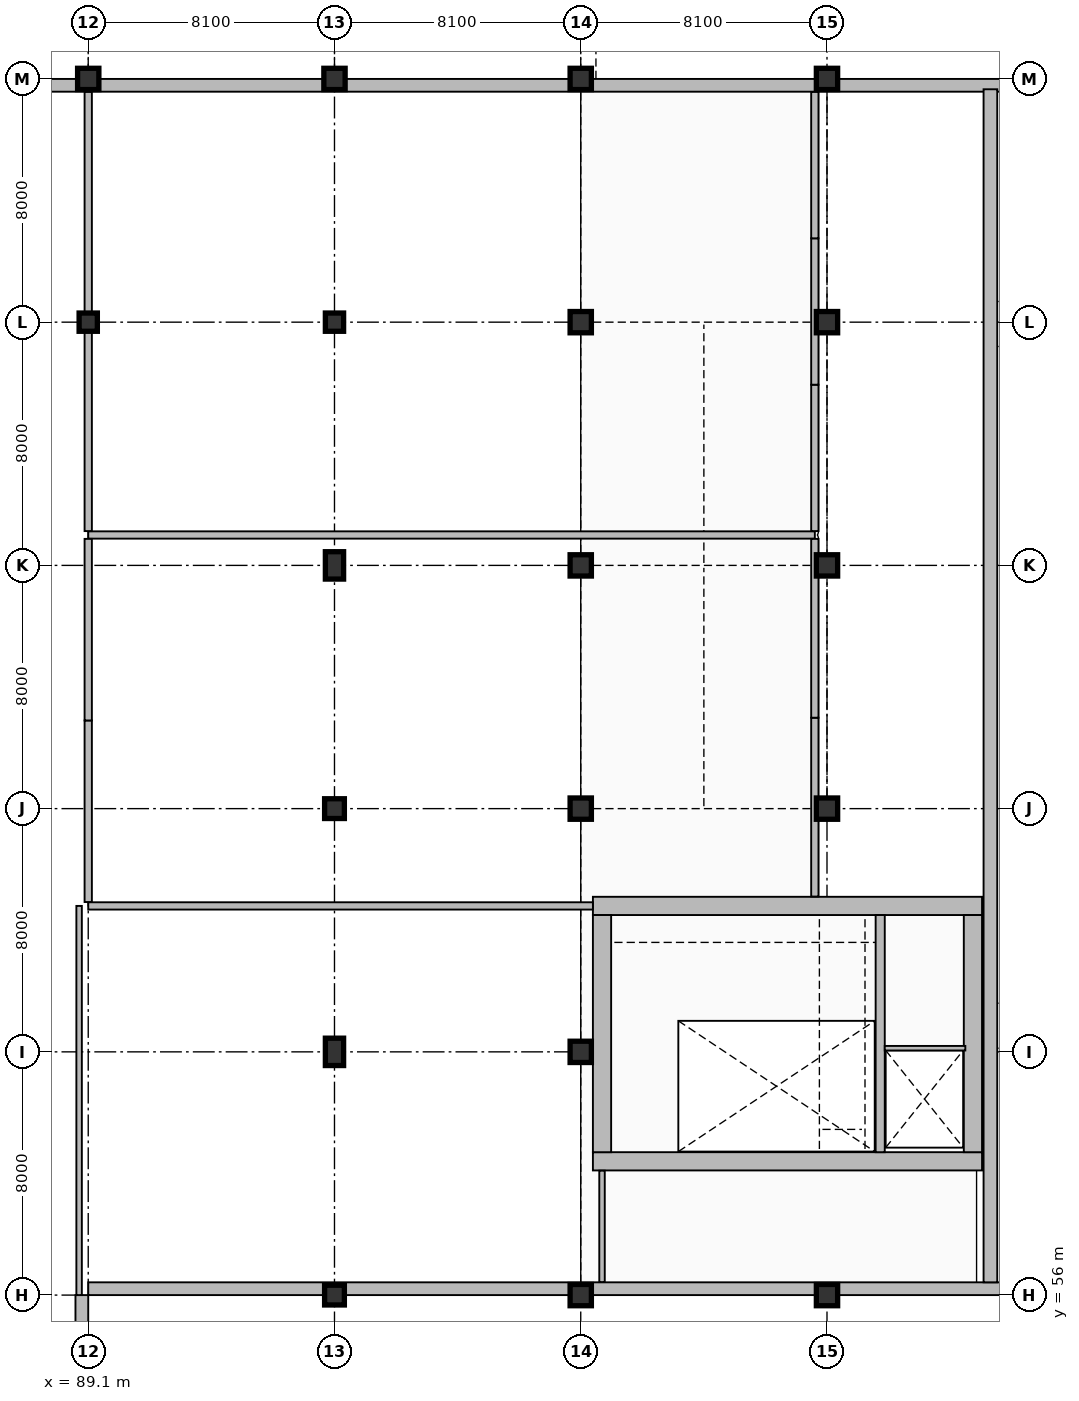
"""IFC4 building model, lengths in metres.
Left out: names, types, materials, properties, quantities, classifications, styles, units other than length and angle.
Written with IfcOpenShell. Run it as: python <this file> out.ifc"""

import sys

from ifc_helpers import new_model, si_unit, direction, frame, frame_2d, origin, origin_2d, place, context, subcontext, project, spatial, rectangle, extrude, element, fill, save


model = new_model("IFC4")
c1 = context("Model", 3, precision=1e-05, world=origin(), true_north=direction((0.0, 1.0)))
c2 = subcontext(c1, "Body", "Model", "MODEL_VIEW")
j1 = project(units=[si_unit("LENGTHUNIT", "METRE"), si_unit("PLANEANGLEUNIT", "RADIAN")], contexts=[c1])
p1 = place(None, origin())
s1 = spatial("IfcSite", under=j1, at=p1, CompositionType="ELEMENT")
p2 = place(p1, origin())
s2 = spatial("IfcBuilding", under=s1, at=p2, CompositionType="ELEMENT")
p3 = place(p2, frame((0.0, 0.0, -4.8)))
s3 = spatial("IfcBuildingStorey", under=s2, at=p3, CompositionType="ELEMENT", Elevation=-4.8)
p4 = place(p3, frame((64.8, 95.79, 0.0), z_axis=(0.0, 0.0, 1.0), x_axis=(1.0, 0.0, 0.0)))
e1 = element("IfcWall", 1, at=p4, inside=s3, PredefinedType="USERDEFINED", context=c2, shape_type="SweptSolid", body=[
    extrude(rectangle(XDim=61.99, YDim=0.42, at=frame_2d((30.995, 0.0))), origin(), (0.0, 0.0, 1.0), 4.45),
])
p5 = place(p3, frame((126.79, 56.21, 0.0), z_axis=(0.0, 0.0, 1.0), x_axis=(-1.0, 0.0, 0.0)))
e2 = element("IfcWall", 2, at=p5, inside=s3, PredefinedType="USERDEFINED", context=c2, shape_type="SweptSolid", body=[
    extrude(rectangle(XDim=37.69, YDim=0.42, at=frame_2d((18.845, 0.0))), origin(), (0.0, 0.0, 1.0), 4.45),
])
p6 = place(p3, frame((88.89, 56.0, 0.0), z_axis=(0.0, 0.0, 1.0), x_axis=(0.0, -1.0, 0.0)))
e3 = element("IfcWall", 3, at=p6, inside=s3, PredefinedType="USERDEFINED", context=c2, shape_type="SweptSolid", body=[
    extrude(rectangle(XDim=31.79, YDim=0.42, at=frame_2d((15.895, 0.0))), origin(), (0.0, 0.0, 1.0), 4.45),
])
p7 = place(p3, frame((118.775, 56.42, 0.0), z_axis=(0.0, 0.0, 1.0), x_axis=(0.0, 1.0, 0.0)))
e4 = element("IfcWall", 4, at=p7, inside=s3, PredefinedType="SHEAR", context=c2, shape_type="SweptSolid", body=[
    extrude(rectangle(XDim=39.24, YDim=0.45, at=frame_2d((19.62, 0.0))), origin(), (0.0, 0.0, 1.0), 4.45),
])
p8 = place(p3, frame((105.7, 60.4, 0.0), z_axis=(0.0, 0.0, 1.0), x_axis=(1.0, 0.0, 0.0)))
e5 = element("IfcWall", 5, at=p8, inside=s3, PredefinedType="SHEAR", context=c2, shape_type="SweptSolid", body=[
    extrude(rectangle(XDim=12.8, YDim=0.6, at=frame_2d((6.4, 0.0))), origin(), (0.0, 0.0, 1.0), 4.8),
])
p9 = place(p8, frame((1.05, 0.0, 0.0)))
e6 = element("IfcOpeningElement", 6, at=p9, cuts=e5, PredefinedType="OPENING", context=c2, shape_type="SweptSolid", body=[
    extrude(rectangle(XDim=1.15, YDim=2.25, at=frame_2d((0.575, 1.125))), frame((0.0, 0.31, 0.0), z_axis=(0.0, -1.0, 0.0), x_axis=(1.0, 0.0, 0.0)), (0.0, 0.0, 1.0), 0.62),
])
p10 = place(p8, frame((10.255, 0.0, 0.0)))
e7 = element("IfcOpeningElement", 7, at=p10, cuts=e5, PredefinedType="OPENING", context=c2, shape_type="SweptSolid", body=[
    extrude(rectangle(XDim=1.3, YDim=2.3, at=frame_2d((0.65, 1.15))), frame((0.0, 0.31, 0.0), z_axis=(0.0, -1.0, 0.0), x_axis=(1.0, 0.0, 0.0)), (0.0, 0.0, 1.0), 0.62),
])
p11 = place(p3, frame((105.7, 68.8, 0.0), z_axis=(0.0, 0.0, 1.0), x_axis=(1.0, 0.0, 0.0)))
e8 = element("IfcWall", 8, at=p11, inside=s3, PredefinedType="SHEAR", context=c2, shape_type="SweptSolid", body=[
    extrude(rectangle(XDim=12.8, YDim=0.6, at=frame_2d((6.4, 0.0))), origin(), (0.0, 0.0, 1.0), 4.8),
])
for number, where, z_axis, x_axis in (
    (9, (106.0, 60.7, 0.0), (0.0, 0.0, 1.0), (0.0, 1.0, 0.0)),
    (10, (118.2, 60.7, 0.0), (0.0, 0.0, 1.0), (0.0, 1.0, 0.0)),
):
    element("IfcWall", number, at=place(p3, frame(where, z_axis=z_axis, x_axis=x_axis)), inside=s3, PredefinedType="SHEAR", context=c2, shape_type="SweptSolid", body=[
        extrude(rectangle(XDim=7.8, YDim=0.6, at=frame_2d((3.9, 0.0))), origin(), (0.0, 0.0, 1.0), 4.8),
    ])
p12 = place(p3, frame((115.15, 60.7, 0.0), z_axis=(0.0, 0.0, 1.0), x_axis=(0.0, 1.0, 0.0)))
e11 = element("IfcWall", 11, at=p12, inside=s3, PredefinedType="SHEAR", context=c2, shape_type="SweptSolid", body=[
    extrude(rectangle(XDim=7.8, YDim=0.3, at=frame_2d((3.9, 0.0))), origin(), (0.0, 0.0, 1.0), 4.8),
])
p13 = place(p3, frame((89.1, 88.0, 0.0), z_axis=(0.0, 0.0, 1.0), x_axis=(1.0, 0.0, 0.0)))
e12 = element("IfcColumn", 12, at=p13, inside=s3, PredefinedType="COLUMN", context=c2, shape_type="SweptSolid", body=[
    extrude(rectangle(XDim=0.6, YDim=0.6, at=origin_2d()), origin(), (0.0, 0.0, 1.0), 4.45),
])
p14 = place(p3, frame((89.1, 96.0, 0.0), z_axis=(0.0, 0.0, 1.0), x_axis=(1.0, 0.0, 0.0)))
e13 = element("IfcColumn", 13, at=p14, inside=s3, PredefinedType="COLUMN", context=c2, shape_type="SweptSolid", body=[
    extrude(rectangle(XDim=0.7, YDim=0.7, at=origin_2d()), origin(), (0.0, 0.0, 1.0), 4.8),
])
p15 = place(p3, frame((97.2, 56.0, 0.0), z_axis=(0.0, 0.0, 1.0), x_axis=(1.0, 0.0, 0.0)))
e14 = element("IfcColumn", 14, at=p15, inside=s3, PredefinedType="COLUMN", context=c2, shape_type="SweptSolid", body=[
    extrude(rectangle(XDim=0.65, YDim=0.65, at=origin_2d()), origin(), (0.0, 0.0, 1.0), 4.8),
])
p16 = place(p3, frame((97.2, 64.0, 0.0), z_axis=(0.0, 0.0, 1.0), x_axis=(1.0, 0.0, 0.0)))
e15 = element("IfcColumn", 15, at=p16, inside=s3, PredefinedType="COLUMN", context=c2, shape_type="SweptSolid", body=[
    extrude(rectangle(XDim=0.6, YDim=0.9, at=origin_2d()), origin(), (0.0, 0.0, 1.0), 4.8),
])
p17 = place(p3, frame((97.2, 72.0, 0.0), z_axis=(0.0, 0.0, 1.0), x_axis=(1.0, 0.0, 0.0)))
e16 = element("IfcColumn", 16, at=p17, inside=s3, PredefinedType="COLUMN", context=c2, shape_type="SweptSolid", body=[
    extrude(rectangle(XDim=0.65, YDim=0.65, at=origin_2d()), origin(), (0.0, 0.0, 1.0), 4.8),
])
p18 = place(p3, frame((97.2, 80.0, 0.0), z_axis=(0.0, 0.0, 1.0), x_axis=(1.0, 0.0, 0.0)))
e17 = element("IfcColumn", 17, at=p18, inside=s3, PredefinedType="COLUMN", context=c2, shape_type="SweptSolid", body=[
    extrude(rectangle(XDim=0.6, YDim=0.9, at=origin_2d()), origin(), (0.0, 0.0, 1.0), 4.8),
])
p19 = place(p3, frame((97.2, 88.0, 0.0), z_axis=(0.0, 0.0, 1.0), x_axis=(1.0, 0.0, 0.0)))
e18 = element("IfcColumn", 18, at=p19, inside=s3, PredefinedType="COLUMN", context=c2, shape_type="SweptSolid", body=[
    extrude(rectangle(XDim=0.6, YDim=0.6, at=origin_2d()), origin(), (0.0, 0.0, 1.0), 4.45),
])
for number, where, z_axis, x_axis in (
    (19, (97.2, 96.0, 0.0), (0.0, 0.0, 1.0), (1.0, 0.0, 0.0)),
    (20, (105.3, 56.0, 0.0), (0.0, 0.0, 1.0), (1.0, 0.0, 0.0)),
    (21, (105.3, 64.0, 0.0), (0.0, 0.0, 1.0), (1.0, 0.0, 0.0)),
    (22, (105.3, 72.0, 0.0), (0.0, 0.0, 1.0), (1.0, 0.0, 0.0)),
    (23, (105.3, 80.0, 0.0), (0.0, 0.0, 1.0), (1.0, 0.0, 0.0)),
    (24, (105.3, 88.0, 0.0), (0.0, 0.0, 1.0), (1.0, 0.0, 0.0)),
    (25, (105.3, 96.0, 0.0), (0.0, 0.0, 1.0), (1.0, 0.0, 0.0)),
    (26, (113.4, 56.0, 0.0), (0.0, 0.0, 1.0), (1.0, 0.0, 0.0)),
    (27, (113.4, 72.0, 0.0), (0.0, 0.0, 1.0), (1.0, 0.0, 0.0)),
    (28, (113.4, 80.0, 0.0), (0.0, 0.0, 1.0), (1.0, 0.0, 0.0)),
    (29, (113.4, 88.0, 0.0), (0.0, 0.0, 1.0), (1.0, 0.0, 0.0)),
    (30, (113.4, 96.0, 0.0), (0.0, 0.0, 1.0), (1.0, 0.0, 0.0)),
):
    element("IfcColumn", number, at=place(p3, frame(where, z_axis=z_axis, x_axis=x_axis)), inside=s3, PredefinedType="COLUMN", context=c2, shape_type="SweptSolid", body=[
        extrude(rectangle(XDim=0.7, YDim=0.7, at=origin_2d()), origin(), (0.0, 0.0, 1.0), 4.8),
    ])
p20 = place(p3, frame((115.3, 64.12, 0.0), z_axis=(0.0, 0.0, 1.0), x_axis=(1.0, 0.0, 0.0)))
e31 = element("IfcWall", 31, at=p20, inside=s3, PredefinedType="PARTITIONING", context=c2, shape_type="SweptSolid", body=[
    extrude(rectangle(XDim=2.65, YDim=0.15, at=frame_2d((1.325, 0.0))), origin(), (0.0, 0.0, 1.0), 4.45),
])
p21 = place(p3, frame((89.1, 68.8, 0.0), z_axis=(0.0, 0.0, 1.0), x_axis=(1.0, 0.0, 0.0)))
e32 = element("IfcWall", 32, at=p21, inside=s3, PredefinedType="PARTITIONING", context=c2, shape_type="SweptSolid", body=[
    extrude(rectangle(XDim=16.6, YDim=0.24, at=frame_2d((8.3, 0.0))), origin(), (0.0, 0.0, 1.0), 4.45),
])
p22 = place(p21, frame((7.6, 0.0, 0.0)))
e33 = element("IfcOpeningElement", 33, at=p22, cuts=e32, PredefinedType="OPENING", context=c2, shape_type="SweptSolid", body=[
    extrude(rectangle(XDim=1.4, YDim=2.35, at=frame_2d((0.7, 1.175))), frame((0.0, 0.13, 0.0), z_axis=(0.0, -1.0, 0.0), x_axis=(1.0, 0.0, 0.0)), (0.0, 0.0, 1.0), 0.26),
])
p23 = place(p3, frame((89.1, 81.0, 0.0), z_axis=(0.0, 0.0, 1.0), x_axis=(1.0, 0.0, 0.0)))
e34 = element("IfcWall", 34, at=p23, inside=s3, PredefinedType="PARTITIONING", context=c2, shape_type="SweptSolid", body=[
    extrude(rectangle(XDim=23.9, YDim=0.24, at=frame_2d((11.95, 0.0))), origin(), (0.0, 0.0, 1.0), 4.45),
])
p24 = place(p23, frame((11.4, 0.0, 0.0)))
e35 = element("IfcOpeningElement", 35, at=p24, cuts=e34, PredefinedType="OPENING", context=c2, shape_type="SweptSolid", body=[
    extrude(rectangle(XDim=1.1, YDim=2.25, at=frame_2d((0.55, 1.125))), frame((0.0, 0.13, 0.0), z_axis=(0.0, -1.0, 0.0), x_axis=(1.0, 0.0, 0.0)), (0.0, 0.0, 1.0), 0.26),
])
p25 = place(p3, frame((88.8, 56.0, 0.0), z_axis=(0.0, 0.0, 1.0), x_axis=(0.0, 1.0, 0.0)))
e36 = element("IfcWall", 36, at=p25, inside=s3, PredefinedType="PARTITIONING", context=c2, shape_type="SweptSolid", body=[
    extrude(rectangle(XDim=12.8, YDim=0.18, at=frame_2d((6.4, 0.0))), origin(), (0.0, 0.0, 1.0), 4.45),
])
p26 = place(p25, frame((5.8, 0.0, 0.0)))
e37 = element("IfcOpeningElement", 37, at=p26, cuts=e36, PredefinedType="OPENING", context=c2, shape_type="SweptSolid", body=[
    extrude(rectangle(XDim=1.2, YDim=2.2, at=frame_2d((0.6, 1.1))), frame((0.0, 0.1, 0.0), z_axis=(0.0, -1.0, 0.0), x_axis=(1.0, 0.0, 0.0)), (0.0, 0.0, 1.0), 0.2),
])
p27 = place(p3, frame((89.1, 68.928, 0.0), z_axis=(0.0, 0.0, 1.0), x_axis=(0.0, 1.0, 0.0)))
e38 = element("IfcWall", 38, at=p27, inside=s3, PredefinedType="PARTITIONING", context=c2, shape_type="SweptSolid", body=[
    extrude(rectangle(XDim=5.972, YDim=0.24, at=frame_2d((2.986, 0.0))), origin(), (0.0, 0.0, 1.0), 4.45),
])
p28 = place(p3, frame((89.1, 74.9, 0.0), z_axis=(0.0, 0.0, 1.0), x_axis=(0.0, 1.0, 0.0)))
e39 = element("IfcWall", 39, at=p28, inside=s3, PredefinedType="PARTITIONING", context=c2, shape_type="SweptSolid", body=[
    extrude(rectangle(XDim=5.972, YDim=0.24, at=frame_2d((2.986, 0.0))), origin(), (0.0, 0.0, 1.0), 4.45),
])
p29 = place(p3, frame((89.1, 81.128, 0.0), z_axis=(0.0, 0.0, 1.0), x_axis=(0.0, 1.0, 0.0)))
e40 = element("IfcWall", 40, at=p29, inside=s3, PredefinedType="PARTITIONING", context=c2, shape_type="SweptSolid", body=[
    extrude(rectangle(XDim=6.564, YDim=0.24, at=frame_2d((3.282, 0.0))), origin(), (0.0, 0.0, 1.0), 4.45),
])
p30 = place(p3, frame((89.1, 88.308, 0.0), z_axis=(0.0, 0.0, 1.0), x_axis=(0.0, 1.0, 0.0)))
e41 = element("IfcWall", 41, at=p30, inside=s3, PredefinedType="PARTITIONING", context=c2, shape_type="SweptSolid", body=[
    extrude(rectangle(XDim=7.264, YDim=0.24, at=frame_2d((3.632, 0.0))), origin(), (0.0, 0.0, 1.0), 4.45),
])
p31 = place(p3, frame((106.0, 56.428, 0.0), z_axis=(0.0, 0.0, 1.0), x_axis=(0.0, 1.0, 0.0)))
e42 = element("IfcWall", 42, at=p31, inside=s3, PredefinedType="PARTITIONING", context=c2, shape_type="SweptSolid", body=[
    extrude(rectangle(XDim=3.664, YDim=0.18, at=frame_2d((1.832, 0.0))), origin(), (0.0, 0.0, 1.0), 4.45),
])
p32 = place(p31, frame((1.232, 0.0, 0.0)))
e43 = element("IfcOpeningElement", 43, at=p32, cuts=e42, PredefinedType="OPENING", context=c2, shape_type="SweptSolid", body=[
    extrude(rectangle(XDim=1.2, YDim=2.2, at=frame_2d((0.6, 1.1))), frame((0.0, 0.1, 0.0), z_axis=(0.0, -1.0, 0.0), x_axis=(1.0, 0.0, 0.0)), (0.0, 0.0, 1.0), 0.2),
])
for number, where, z_axis, x_axis in (
    (44, (113.0, 69.108, 0.0), (0.0, 0.0, 1.0), (0.0, 1.0, 0.0)),
    (45, (113.0, 74.99, 0.0), (0.0, 0.0, 1.0), (0.0, 1.0, 0.0)),
):
    element("IfcWall", number, at=place(p3, frame(where, z_axis=z_axis, x_axis=x_axis)), inside=s3, PredefinedType="PARTITIONING", context=c2, shape_type="SweptSolid", body=[
        extrude(rectangle(XDim=5.882, YDim=0.24, at=frame_2d((2.941, 0.0))), origin(), (0.0, 0.0, 1.0), 3.692),
    ])
for number, where, z_axis, x_axis in (
    (46, (113.0, 81.128, 0.0), (0.0, 0.0, 1.0), (0.0, 1.0, 0.0)),
    (47, (113.0, 85.943, 0.0), (0.0, 0.0, 1.0), (0.0, 1.0, 0.0)),
    (48, (113.0, 90.757, 0.0), (0.0, 0.0, 1.0), (0.0, 1.0, 0.0)),
):
    element("IfcWall", number, at=place(p3, frame(where, z_axis=z_axis, x_axis=x_axis)), inside=s3, PredefinedType="PARTITIONING", context=c2, shape_type="SweptSolid", body=[
        extrude(rectangle(XDim=4.815, YDim=0.24, at=frame_2d((2.407, 0.0))), origin(), (0.0, 0.0, 1.0), 3.692),
    ])
p33 = place(p9, frame((1.15, 0.0, 0.0), z_axis=(0.0, 0.0, 1.0), x_axis=(-1.0, 0.0, 0.0)))
e49 = element("IfcDoor", 49, at=p33, inside=s3, OperationType="SINGLE_SWING_LEFT", PredefinedType="DOOR", context=c2, shape_type="SweptSolid", body=[
    extrude(rectangle(XDim=1.15, YDim=2.25, at=frame_2d((0.575, 1.125))), frame((0.0, 0.025, 0.0), z_axis=(0.0, -1.0, 0.0), x_axis=(1.0, 0.0, 0.0)), (0.0, 0.0, 1.0), 0.05),
])
fill(e6, e49)
p34 = place(p10, frame((1.3, 0.0, 0.0), z_axis=(0.0, 0.0, 1.0), x_axis=(-1.0, 0.0, 0.0)))
e50 = element("IfcDoor", 50, at=p34, inside=s3, OperationType="DOUBLE_DOOR_SLIDING", PredefinedType="DOOR", context=c2, shape_type="SweptSolid", body=[
    extrude(rectangle(XDim=1.3, YDim=2.3, at=frame_2d((0.65, 1.15))), frame((0.0, 0.025, 0.0), z_axis=(0.0, -1.0, 0.0), x_axis=(1.0, 0.0, 0.0)), (0.0, 0.0, 1.0), 0.05),
])
fill(e7, e50)
p35 = place(p22, origin())
e51 = element("IfcDoor", 51, at=p35, inside=s3, OperationType="DOUBLE_DOOR_SINGLE_SWING", PredefinedType="DOOR", context=c2, shape_type="SweptSolid", body=[
    extrude(rectangle(XDim=1.4, YDim=2.35, at=frame_2d((0.7, 1.175))), frame((0.0, 0.025, 0.0), z_axis=(0.0, -1.0, 0.0), x_axis=(1.0, 0.0, 0.0)), (0.0, 0.0, 1.0), 0.05),
])
fill(e33, e51)
p36 = place(p24, origin())
e52 = element("IfcDoor", 52, at=p36, inside=s3, OperationType="SINGLE_SWING_LEFT", PredefinedType="DOOR", context=c2, shape_type="SweptSolid", body=[
    extrude(rectangle(XDim=1.1, YDim=2.25, at=frame_2d((0.55, 1.125))), frame((0.0, 0.025, 0.0), z_axis=(0.0, -1.0, 0.0), x_axis=(1.0, 0.0, 0.0)), (0.0, 0.0, 1.0), 0.05),
])
fill(e35, e52)
p37 = place(p26, frame((1.2, 0.0, 0.0), z_axis=(0.0, 0.0, 1.0), x_axis=(-1.0, 0.0, 0.0)))
e53 = element("IfcDoor", 53, at=p37, inside=s3, OperationType="SINGLE_SWING_LEFT", PredefinedType="DOOR", context=c2, shape_type="SweptSolid", body=[
    extrude(rectangle(XDim=1.2, YDim=2.2, at=frame_2d((0.6, 1.1))), frame((0.0, 0.025, 0.0), z_axis=(0.0, -1.0, 0.0), x_axis=(1.0, 0.0, 0.0)), (0.0, 0.0, 1.0), 0.05),
])
fill(e37, e53)
p38 = place(p32, origin())
e54 = element("IfcDoor", 54, at=p38, inside=s3, OperationType="SINGLE_SWING_RIGHT", PredefinedType="DOOR", context=c2, shape_type="SweptSolid", body=[
    extrude(rectangle(XDim=1.2, YDim=2.2, at=frame_2d((0.6, 1.1))), frame((0.0, 0.025, 0.0), z_axis=(0.0, -1.0, 0.0), x_axis=(1.0, 0.0, 0.0)), (0.0, 0.0, 1.0), 0.05),
])
fill(e43, e54)
save(model, sys.argv[1])
